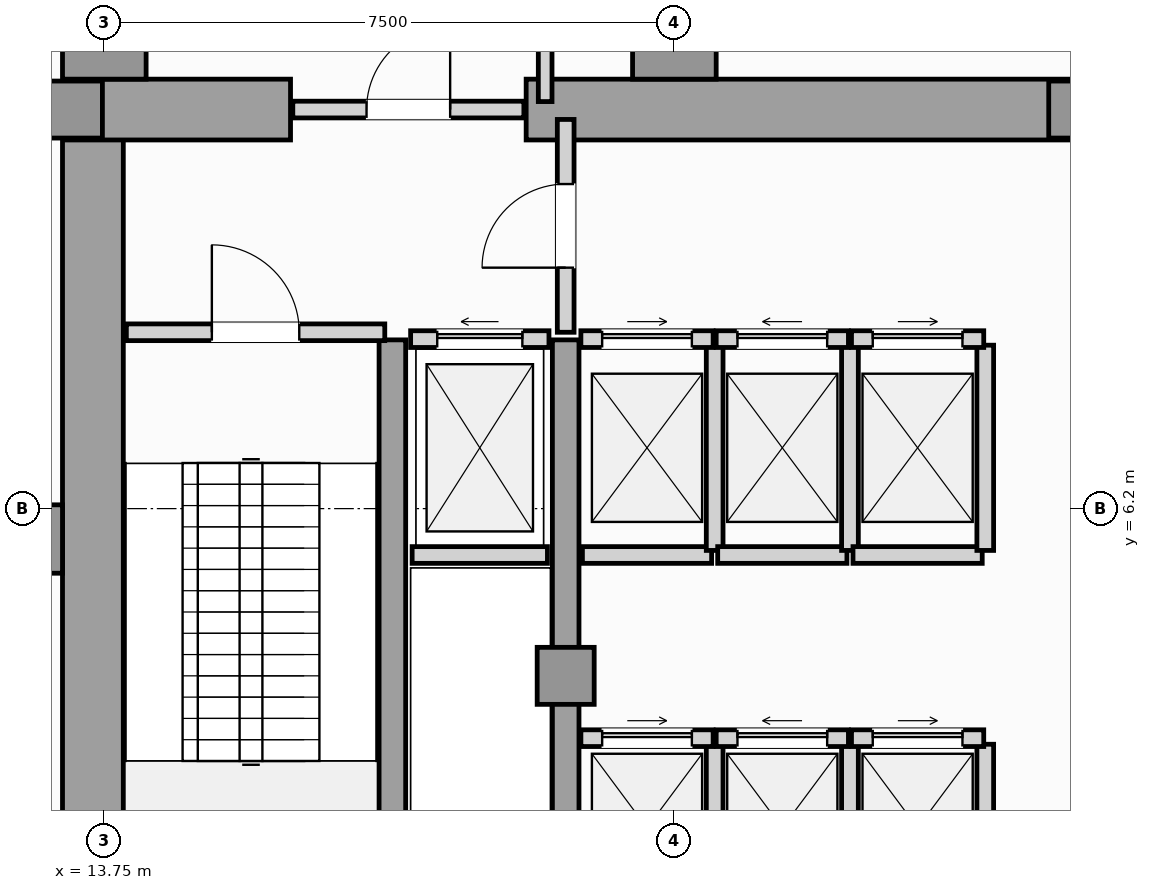
"""IFC4 building model, lengths in metres.
Left out: names, types, materials, properties, quantities, classifications, styles, units other than length and angle.
Written with IfcOpenShell. Run it as: python <this file> out.ifc"""

import sys

from ifc_helpers import new_model, si_unit, direction, frame, frame_2d, origin, origin_2d, place, context, subcontext, project, spatial, rectangle, extrude, element, fill, save


model = new_model("IFC4")
c1 = context("Model", 3, precision=1e-05, world=origin(), true_north=direction((0.0, 1.0)))
c2 = subcontext(c1, "Body", "Model", "MODEL_VIEW")
j1 = project(units=[si_unit("LENGTHUNIT", "METRE"), si_unit("PLANEANGLEUNIT", "RADIAN")], contexts=[c1])
p1 = place(None, origin())
s1 = spatial("IfcSite", under=j1, at=p1, CompositionType="ELEMENT")
p2 = place(p1, origin())
s2 = spatial("IfcBuilding", under=s1, at=p2, CompositionType="ELEMENT")
p3 = place(p2, origin())
s3 = spatial("IfcBuildingStorey", under=s2, at=p3, CompositionType="ELEMENT", Elevation=0.0)
p4 = place(p3, frame((13.6, 0.92, 0.0), z_axis=(0.0, 0.0, 1.0), x_axis=(0.0, 1.0, 0.0)))
e1 = element("IfcWall", 1, at=p4, inside=s3, PredefinedType="SHEAR", context=c2, shape_type="SweptSolid", body=[
    extrude(rectangle(XDim=10.53, YDim=0.8, at=frame_2d((5.265, 0.0))), origin(), (0.0, 0.0, 1.0), 5.1),
])
p5 = place(p3, frame((13.25, 11.45, 0.0), z_axis=(0.0, 0.0, 1.0), x_axis=(1.0, 0.0, 0.0)))
e2 = element("IfcWall", 2, at=p5, inside=s3, PredefinedType="SHEAR", context=c2, shape_type="SweptSolid", body=[
    extrude(rectangle(XDim=2.95, YDim=0.8, at=frame_2d((1.475, 0.0))), origin(), (0.0, 0.0, 1.0), 5.1),
])
p6 = place(p3, frame((19.3, 11.45, 0.0), z_axis=(0.0, 0.0, 1.0), x_axis=(1.0, 0.0, 0.0)))
e3 = element("IfcWall", 3, at=p6, inside=s3, PredefinedType="SHEAR", context=c2, shape_type="SweptSolid", body=[
    extrude(rectangle(XDim=7.3, YDim=0.8, at=frame_2d((3.65, 0.0))), origin(), (0.0, 0.0, 1.0), 5.1),
])
for number, where, z_axis, x_axis in (
    (4, (17.54, 0.92, 0.0), (0.0, 0.0, 1.0), (0.0, 1.0, 0.0)),
    (5, (19.82, 0.92, 0.0), (0.0, 0.0, 1.0), (0.0, 1.0, 0.0)),
):
    element("IfcWall", number, at=place(p3, frame(where, z_axis=z_axis, x_axis=x_axis)), inside=s3, PredefinedType="SHEAR", context=c2, shape_type="SweptSolid", body=[
        extrude(rectangle(XDim=7.5, YDim=0.35, at=frame_2d((3.75, 0.0))), origin(), (0.0, 0.0, 1.0), 5.1),
    ])
p7 = place(p3, frame((12.9, 5.8, 0.0), z_axis=(0.0, 0.0, 1.0), x_axis=(1.0, 0.0, 0.0)))
e6 = element("IfcColumn", 6, at=p7, inside=s3, PredefinedType="PILASTER", context=c2, shape_type="SweptSolid", body=[
    extrude(rectangle(XDim=0.6, YDim=0.9, at=origin_2d()), origin(), (0.0, 0.0, 1.0), 5.4),
])
for number, where, z_axis, x_axis in (
    (7, (13.35, 11.45, 0.0), (0.0, 0.0, 1.0), (1.0, 0.0, 0.0)),
    (8, (19.82, 4.0, 0.0), (0.0, 0.0, 1.0), (1.0, 0.0, 0.0)),
    (9, (26.55, 11.45, 0.0), (0.0, 0.0, 1.0), (1.0, 0.0, 0.0)),
):
    element("IfcColumn", number, at=place(p3, frame(where, z_axis=z_axis, x_axis=x_axis)), inside=s3, PredefinedType="COLUMN", context=c2, shape_type="SweptSolid", body=[
        extrude(rectangle(XDim=0.75, YDim=0.75, at=origin_2d()), origin(), (0.0, 0.0, 1.0), 5.4),
    ])
for number, where, z_axis, x_axis in (
    (10, (13.75, 12.4, 0.0), (0.0, 0.0, 1.0), (1.0, 0.0, 0.0)),
    (11, (21.25, 12.4, 0.0), (0.0, 0.0, 1.0), (1.0, 0.0, 0.0)),
):
    element("IfcColumn", number, at=place(p3, frame(where, z_axis=z_axis, x_axis=x_axis)), inside=s3, PredefinedType="COLUMN", context=c2, shape_type="SweptSolid", body=[
        extrude(rectangle(XDim=1.1, YDim=1.1, at=origin_2d()), origin(), (0.0, 0.0, 1.0), 5.4),
    ])
p8 = place(p3, frame((17.8, 5.59, 0.0), z_axis=(0.0, 0.0, 1.0), x_axis=(1.0, 0.0, 0.0)))
e12 = element("IfcWall", 12, at=p8, inside=s3, PredefinedType="SOLIDWALL", context=c2, shape_type="SweptSolid", body=[
    extrude(rectangle(XDim=1.78, YDim=0.22, at=frame_2d((0.89, 0.0))), origin(), (0.0, 0.0, 1.0), 5.1),
])
p9 = place(p3, frame((17.78, 8.43, 0.0), z_axis=(0.0, 0.0, 1.0), x_axis=(1.0, 0.0, 0.0)))
e13 = element("IfcWall", 13, at=p9, inside=s3, PredefinedType="SOLIDWALL", context=c2, shape_type="SweptSolid", body=[
    extrude(rectangle(XDim=1.82, YDim=0.22, at=frame_2d((0.91, 0.0))), origin(), (0.0, 0.0, 1.0), 5.1),
])
p10 = place(p9, frame((0.35, 0.0, 0.0)))
e14 = element("IfcOpeningElement", 14, at=p10, cuts=e13, PredefinedType="OPENING", context=c2, shape_type="SweptSolid", body=[
    extrude(rectangle(XDim=1.12, YDim=2.25, at=frame_2d((0.56, 1.125))), frame((0.0, 0.12, 0.0), z_axis=(0.0, -1.0, 0.0), x_axis=(1.0, 0.0, 0.0)), (0.0, 0.0, 1.0), 0.24),
])
p11 = place(p3, frame((21.78, 0.9, 0.0), z_axis=(0.0, 0.0, 1.0), x_axis=(0.0, 1.0, 0.0)))
e15 = element("IfcWall", 15, at=p11, inside=s3, PredefinedType="SOLIDWALL", context=c2, shape_type="SweptSolid", body=[
    extrude(rectangle(XDim=2.2, YDim=0.22, at=frame_2d((1.1, 0.0))), origin(), (0.0, 0.0, 1.0), 5.1),
])
p12 = place(p3, frame((20.02, 3.18, 0.0), z_axis=(0.0, 0.0, 1.0), x_axis=(1.0, 0.0, 0.0)))
e16 = element("IfcWall", 16, at=p12, inside=s3, PredefinedType="SOLIDWALL", context=c2, shape_type="SweptSolid", body=[
    extrude(rectangle(XDim=1.74, YDim=0.22, at=frame_2d((0.87, 0.0))), origin(), (0.0, 0.0, 1.0), 5.1),
])
p13 = place(p12, frame((0.28, 0.0, 0.0)))
e17 = element("IfcOpeningElement", 17, at=p13, cuts=e16, PredefinedType="OPENING", context=c2, shape_type="SweptSolid", body=[
    extrude(rectangle(XDim=1.18, YDim=2.2, at=frame_2d((0.59, 1.1))), frame((0.0, 0.12, 0.0), z_axis=(0.0, -1.0, 0.0), x_axis=(1.0, 0.0, 0.0)), (0.0, 0.0, 1.0), 0.24),
])
p14 = place(p3, frame((23.56, 0.9, 0.0), z_axis=(0.0, 0.0, 1.0), x_axis=(0.0, 1.0, 0.0)))
e18 = element("IfcWall", 18, at=p14, inside=s3, PredefinedType="SOLIDWALL", context=c2, shape_type="SweptSolid", body=[
    extrude(rectangle(XDim=2.2, YDim=0.22, at=frame_2d((1.1, 0.0))), origin(), (0.0, 0.0, 1.0), 5.1),
])
p15 = place(p3, frame((21.8, 3.18, 0.0), z_axis=(0.0, 0.0, 1.0), x_axis=(1.0, 0.0, 0.0)))
e19 = element("IfcWall", 19, at=p15, inside=s3, PredefinedType="SOLIDWALL", context=c2, shape_type="SweptSolid", body=[
    extrude(rectangle(XDim=1.74, YDim=0.22, at=frame_2d((0.87, 0.0))), origin(), (0.0, 0.0, 1.0), 5.1),
])
p16 = place(p15, frame((0.28, 0.0, 0.0)))
e20 = element("IfcOpeningElement", 20, at=p16, cuts=e19, PredefinedType="OPENING", context=c2, shape_type="SweptSolid", body=[
    extrude(rectangle(XDim=1.18, YDim=2.2, at=frame_2d((0.59, 1.1))), frame((0.0, 0.12, 0.0), z_axis=(0.0, -1.0, 0.0), x_axis=(1.0, 0.0, 0.0)), (0.0, 0.0, 1.0), 0.24),
])
p17 = place(p3, frame((25.34, 0.9, 0.0), z_axis=(0.0, 0.0, 1.0), x_axis=(0.0, 1.0, 0.0)))
e21 = element("IfcWall", 21, at=p17, inside=s3, PredefinedType="SOLIDWALL", context=c2, shape_type="SweptSolid", body=[
    extrude(rectangle(XDim=2.2, YDim=0.22, at=frame_2d((1.1, 0.0))), origin(), (0.0, 0.0, 1.0), 5.1),
])
p18 = place(p3, frame((23.58, 3.18, 0.0), z_axis=(0.0, 0.0, 1.0), x_axis=(1.0, 0.0, 0.0)))
e22 = element("IfcWall", 22, at=p18, inside=s3, PredefinedType="SOLIDWALL", context=c2, shape_type="SweptSolid", body=[
    extrude(rectangle(XDim=1.74, YDim=0.22, at=frame_2d((0.87, 0.0))), origin(), (0.0, 0.0, 1.0), 5.1),
])
p19 = place(p18, frame((0.28, 0.0, 0.0)))
e23 = element("IfcOpeningElement", 23, at=p19, cuts=e22, PredefinedType="OPENING", context=c2, shape_type="SweptSolid", body=[
    extrude(rectangle(XDim=1.18, YDim=2.2, at=frame_2d((0.59, 1.1))), frame((0.0, 0.12, 0.0), z_axis=(0.0, -1.0, 0.0), x_axis=(1.0, 0.0, 0.0)), (0.0, 0.0, 1.0), 0.24),
])
p20 = place(p3, frame((20.04, 5.59, 0.0), z_axis=(0.0, 0.0, 1.0), x_axis=(1.0, 0.0, 0.0)))
e24 = element("IfcWall", 24, at=p20, inside=s3, PredefinedType="SOLIDWALL", context=c2, shape_type="SweptSolid", body=[
    extrude(rectangle(XDim=1.7, YDim=0.22, at=frame_2d((0.85, 0.0))), origin(), (0.0, 0.0, 1.0), 5.1),
])
p21 = place(p3, frame((21.78, 5.65, 0.0), z_axis=(0.0, 0.0, 1.0), x_axis=(0.0, 1.0, 0.0)))
e25 = element("IfcWall", 25, at=p21, inside=s3, PredefinedType="SOLIDWALL", context=c2, shape_type="SweptSolid", body=[
    extrude(rectangle(XDim=2.7, YDim=0.22, at=frame_2d((1.35, 0.0))), origin(), (0.0, 0.0, 1.0), 5.1),
])
p22 = place(p3, frame((20.02, 8.43, 0.0), z_axis=(0.0, 0.0, 1.0), x_axis=(1.0, 0.0, 0.0)))
e26 = element("IfcWall", 26, at=p22, inside=s3, PredefinedType="SOLIDWALL", context=c2, shape_type="SweptSolid", body=[
    extrude(rectangle(XDim=1.74, YDim=0.22, at=frame_2d((0.87, 0.0))), origin(), (0.0, 0.0, 1.0), 5.1),
])
p23 = place(p22, frame((0.28, 0.0, 0.0)))
e27 = element("IfcOpeningElement", 27, at=p23, cuts=e26, PredefinedType="OPENING", context=c2, shape_type="SweptSolid", body=[
    extrude(rectangle(XDim=1.18, YDim=2.2, at=frame_2d((0.59, 1.1))), frame((0.0, 0.12, 0.0), z_axis=(0.0, -1.0, 0.0), x_axis=(1.0, 0.0, 0.0)), (0.0, 0.0, 1.0), 0.24),
])
p24 = place(p3, frame((21.82, 5.59, 0.0), z_axis=(0.0, 0.0, 1.0), x_axis=(1.0, 0.0, 0.0)))
e28 = element("IfcWall", 28, at=p24, inside=s3, PredefinedType="SOLIDWALL", context=c2, shape_type="SweptSolid", body=[
    extrude(rectangle(XDim=1.7, YDim=0.22, at=frame_2d((0.85, 0.0))), origin(), (0.0, 0.0, 1.0), 5.1),
])
p25 = place(p3, frame((23.56, 5.65, 0.0), z_axis=(0.0, 0.0, 1.0), x_axis=(0.0, 1.0, 0.0)))
e29 = element("IfcWall", 29, at=p25, inside=s3, PredefinedType="SOLIDWALL", context=c2, shape_type="SweptSolid", body=[
    extrude(rectangle(XDim=2.7, YDim=0.22, at=frame_2d((1.35, 0.0))), origin(), (0.0, 0.0, 1.0), 5.1),
])
p26 = place(p3, frame((21.8, 8.43, 0.0), z_axis=(0.0, 0.0, 1.0), x_axis=(1.0, 0.0, 0.0)))
e30 = element("IfcWall", 30, at=p26, inside=s3, PredefinedType="SOLIDWALL", context=c2, shape_type="SweptSolid", body=[
    extrude(rectangle(XDim=1.74, YDim=0.22, at=frame_2d((0.87, 0.0))), origin(), (0.0, 0.0, 1.0), 5.1),
])
p27 = place(p26, frame((0.28, 0.0, 0.0)))
e31 = element("IfcOpeningElement", 31, at=p27, cuts=e30, PredefinedType="OPENING", context=c2, shape_type="SweptSolid", body=[
    extrude(rectangle(XDim=1.18, YDim=2.2, at=frame_2d((0.59, 1.1))), frame((0.0, 0.12, 0.0), z_axis=(0.0, -1.0, 0.0), x_axis=(1.0, 0.0, 0.0)), (0.0, 0.0, 1.0), 0.24),
])
p28 = place(p3, frame((23.6, 5.59, 0.0), z_axis=(0.0, 0.0, 1.0), x_axis=(1.0, 0.0, 0.0)))
e32 = element("IfcWall", 32, at=p28, inside=s3, PredefinedType="SOLIDWALL", context=c2, shape_type="SweptSolid", body=[
    extrude(rectangle(XDim=1.7, YDim=0.22, at=frame_2d((0.85, 0.0))), origin(), (0.0, 0.0, 1.0), 5.1),
])
p29 = place(p3, frame((25.34, 5.65, 0.0), z_axis=(0.0, 0.0, 1.0), x_axis=(0.0, 1.0, 0.0)))
e33 = element("IfcWall", 33, at=p29, inside=s3, PredefinedType="SOLIDWALL", context=c2, shape_type="SweptSolid", body=[
    extrude(rectangle(XDim=2.7, YDim=0.22, at=frame_2d((1.35, 0.0))), origin(), (0.0, 0.0, 1.0), 5.1),
])
p30 = place(p3, frame((23.58, 8.43, 0.0), z_axis=(0.0, 0.0, 1.0), x_axis=(1.0, 0.0, 0.0)))
e34 = element("IfcWall", 34, at=p30, inside=s3, PredefinedType="SOLIDWALL", context=c2, shape_type="SweptSolid", body=[
    extrude(rectangle(XDim=1.74, YDim=0.22, at=frame_2d((0.87, 0.0))), origin(), (0.0, 0.0, 1.0), 5.1),
])
p31 = place(p30, frame((0.28, 0.0, 0.0)))
e35 = element("IfcOpeningElement", 35, at=p31, cuts=e34, PredefinedType="OPENING", context=c2, shape_type="SweptSolid", body=[
    extrude(rectangle(XDim=1.18, YDim=2.2, at=frame_2d((0.59, 1.1))), frame((0.0, 0.12, 0.0), z_axis=(0.0, -1.0, 0.0), x_axis=(1.0, 0.0, 0.0)), (0.0, 0.0, 1.0), 0.24),
])
p32 = place(p3, frame((14.04, 8.52, 0.0), z_axis=(0.0, 0.0, 1.0), x_axis=(1.0, 0.0, 0.0)))
e36 = element("IfcWall", 36, at=p32, inside=s3, PredefinedType="SOLIDWALL", context=c2, shape_type="SweptSolid", body=[
    extrude(rectangle(XDim=3.4, YDim=0.22, at=frame_2d((1.7, 0.0))), origin(), (0.0, 0.0, 1.0), 5.1),
])
p33 = place(p32, frame((1.125, 0.0, 0.0)))
e37 = element("IfcOpeningElement", 37, at=p33, cuts=e36, PredefinedType="OPENING", context=c2, shape_type="SweptSolid", body=[
    extrude(rectangle(XDim=1.15, YDim=2.2, at=frame_2d((0.575, 1.1))), frame((0.0, 0.12, 0.0), z_axis=(0.0, -1.0, 0.0), x_axis=(1.0, 0.0, 0.0)), (0.0, 0.0, 1.0), 0.24),
])
p34 = place(p3, frame((19.82, 8.52, 0.0), z_axis=(0.0, 0.0, 1.0), x_axis=(0.0, 1.0, 0.0)))
e38 = element("IfcWall", 38, at=p34, inside=s3, PredefinedType="SOLIDWALL", context=c2, shape_type="SweptSolid", body=[
    extrude(rectangle(XDim=2.8, YDim=0.22, at=frame_2d((1.4, 0.0))), origin(), (0.0, 0.0, 1.0), 4.555),
])
p35 = place(p34, frame((0.85, 0.0, 0.0)))
e39 = element("IfcOpeningElement", 39, at=p35, cuts=e38, PredefinedType="OPENING", context=c2, shape_type="SweptSolid", body=[
    extrude(rectangle(XDim=1.1, YDim=2.2, at=frame_2d((0.55, 1.1))), frame((0.0, 0.12, 0.0), z_axis=(0.0, -1.0, 0.0), x_axis=(1.0, 0.0, 0.0)), (0.0, 0.0, 1.0), 0.24),
])
p36 = place(p3, frame((16.23, 11.45, 0.0), z_axis=(0.0, 0.0, 1.0), x_axis=(1.0, 0.0, 0.0)))
e40 = element("IfcWall", 40, at=p36, inside=s3, PredefinedType="SOLIDWALL", context=c2, shape_type="SweptSolid", body=[
    extrude(rectangle(XDim=3.04, YDim=0.22, at=frame_2d((1.52, 0.0))), origin(), (0.0, 0.0, 1.0), 5.1),
])
p37 = place(p36, frame((0.97, 0.0, 0.0)))
e41 = element("IfcOpeningElement", 41, at=p37, cuts=e40, PredefinedType="OPENING", context=c2, shape_type="SweptSolid", body=[
    extrude(rectangle(XDim=1.1, YDim=2.2, at=frame_2d((0.55, 1.1))), frame((0.0, 0.12, 0.0), z_axis=(0.0, -1.0, 0.0), x_axis=(1.0, 0.0, 0.0)), (0.0, 0.0, 1.0), 0.24),
])
p38 = place(p3, frame((19.55, 11.555, 0.0), z_axis=(0.0, 0.0, 1.0), x_axis=(0.0, 1.0, 0.0)))
e42 = element("IfcWall", 42, at=p38, inside=s3, PredefinedType="PARTITIONING", context=c2, shape_type="SweptSolid", body=[
    extrude(rectangle(XDim=3.39, YDim=0.18, at=frame_2d((1.695, 0.0))), origin(), (0.0, 0.0, 1.0), 5.1),
])
p39 = place(p10, origin())
e43 = element("IfcDoor", 43, at=p39, inside=s3, OperationType="SLIDING_TO_LEFT", PredefinedType="DOOR", context=c2, shape_type="SweptSolid", body=[
    extrude(rectangle(XDim=1.12, YDim=2.25, at=frame_2d((0.56, 1.125))), frame((0.0, 0.025, 0.0), z_axis=(0.0, -1.0, 0.0), x_axis=(1.0, 0.0, 0.0)), (0.0, 0.0, 1.0), 0.05),
])
fill(e14, e43)
p40 = place(p13, origin())
e44 = element("IfcDoor", 44, at=p40, inside=s3, OperationType="SLIDING_TO_RIGHT", PredefinedType="DOOR", context=c2, shape_type="SweptSolid", body=[
    extrude(rectangle(XDim=1.18, YDim=2.2, at=frame_2d((0.59, 1.1))), frame((0.0, 0.025, 0.0), z_axis=(0.0, -1.0, 0.0), x_axis=(1.0, 0.0, 0.0)), (0.0, 0.0, 1.0), 0.05),
])
fill(e17, e44)
p41 = place(p16, origin())
e45 = element("IfcDoor", 45, at=p41, inside=s3, OperationType="SLIDING_TO_LEFT", PredefinedType="DOOR", context=c2, shape_type="SweptSolid", body=[
    extrude(rectangle(XDim=1.18, YDim=2.2, at=frame_2d((0.59, 1.1))), frame((0.0, 0.025, 0.0), z_axis=(0.0, -1.0, 0.0), x_axis=(1.0, 0.0, 0.0)), (0.0, 0.0, 1.0), 0.05),
])
fill(e20, e45)
p42 = place(p19, origin())
e46 = element("IfcDoor", 46, at=p42, inside=s3, OperationType="SLIDING_TO_RIGHT", PredefinedType="DOOR", context=c2, shape_type="SweptSolid", body=[
    extrude(rectangle(XDim=1.18, YDim=2.2, at=frame_2d((0.59, 1.1))), frame((0.0, 0.025, 0.0), z_axis=(0.0, -1.0, 0.0), x_axis=(1.0, 0.0, 0.0)), (0.0, 0.0, 1.0), 0.05),
])
fill(e23, e46)
p43 = place(p23, origin())
e47 = element("IfcDoor", 47, at=p43, inside=s3, OperationType="SLIDING_TO_RIGHT", PredefinedType="DOOR", context=c2, shape_type="SweptSolid", body=[
    extrude(rectangle(XDim=1.18, YDim=2.2, at=frame_2d((0.59, 1.1))), frame((0.0, 0.025, 0.0), z_axis=(0.0, -1.0, 0.0), x_axis=(1.0, 0.0, 0.0)), (0.0, 0.0, 1.0), 0.05),
])
fill(e27, e47)
p44 = place(p27, origin())
e48 = element("IfcDoor", 48, at=p44, inside=s3, OperationType="SLIDING_TO_LEFT", PredefinedType="DOOR", context=c2, shape_type="SweptSolid", body=[
    extrude(rectangle(XDim=1.18, YDim=2.2, at=frame_2d((0.59, 1.1))), frame((0.0, 0.025, 0.0), z_axis=(0.0, -1.0, 0.0), x_axis=(1.0, 0.0, 0.0)), (0.0, 0.0, 1.0), 0.05),
])
fill(e31, e48)
p45 = place(p31, origin())
e49 = element("IfcDoor", 49, at=p45, inside=s3, OperationType="SLIDING_TO_RIGHT", PredefinedType="DOOR", context=c2, shape_type="SweptSolid", body=[
    extrude(rectangle(XDim=1.18, YDim=2.2, at=frame_2d((0.59, 1.1))), frame((0.0, 0.025, 0.0), z_axis=(0.0, -1.0, 0.0), x_axis=(1.0, 0.0, 0.0)), (0.0, 0.0, 1.0), 0.05),
])
fill(e35, e49)
p46 = place(p33, origin())
e50 = element("IfcDoor", 50, at=p46, inside=s3, OperationType="SINGLE_SWING_LEFT", PredefinedType="DOOR", context=c2, shape_type="SweptSolid", body=[
    extrude(rectangle(XDim=1.15, YDim=2.2, at=frame_2d((0.575, 1.1))), frame((0.0, 0.025, 0.0), z_axis=(0.0, -1.0, 0.0), x_axis=(1.0, 0.0, 0.0)), (0.0, 0.0, 1.0), 0.05),
])
fill(e37, e50)
p47 = place(p35, origin())
e51 = element("IfcDoor", 51, at=p47, inside=s3, OperationType="SINGLE_SWING_LEFT", PredefinedType="DOOR", context=c2, shape_type="SweptSolid", body=[
    extrude(rectangle(XDim=1.1, YDim=2.2, at=frame_2d((0.55, 1.1))), frame((0.0, 0.025, 0.0), z_axis=(0.0, -1.0, 0.0), x_axis=(1.0, 0.0, 0.0)), (0.0, 0.0, 1.0), 0.05),
])
fill(e39, e51)
p48 = place(p37, origin())
e52 = element("IfcDoor", 52, at=p48, inside=s3, OperationType="SINGLE_SWING_RIGHT", PredefinedType="DOOR", context=c2, shape_type="SweptSolid", body=[
    extrude(rectangle(XDim=1.1, YDim=2.2, at=frame_2d((0.55, 1.1))), frame((0.0, 0.025, 0.0), z_axis=(0.0, -1.0, 0.0), x_axis=(1.0, 0.0, 0.0)), (0.0, 0.0, 1.0), 0.05),
])
fill(e41, e52)
save(model, sys.argv[1])
